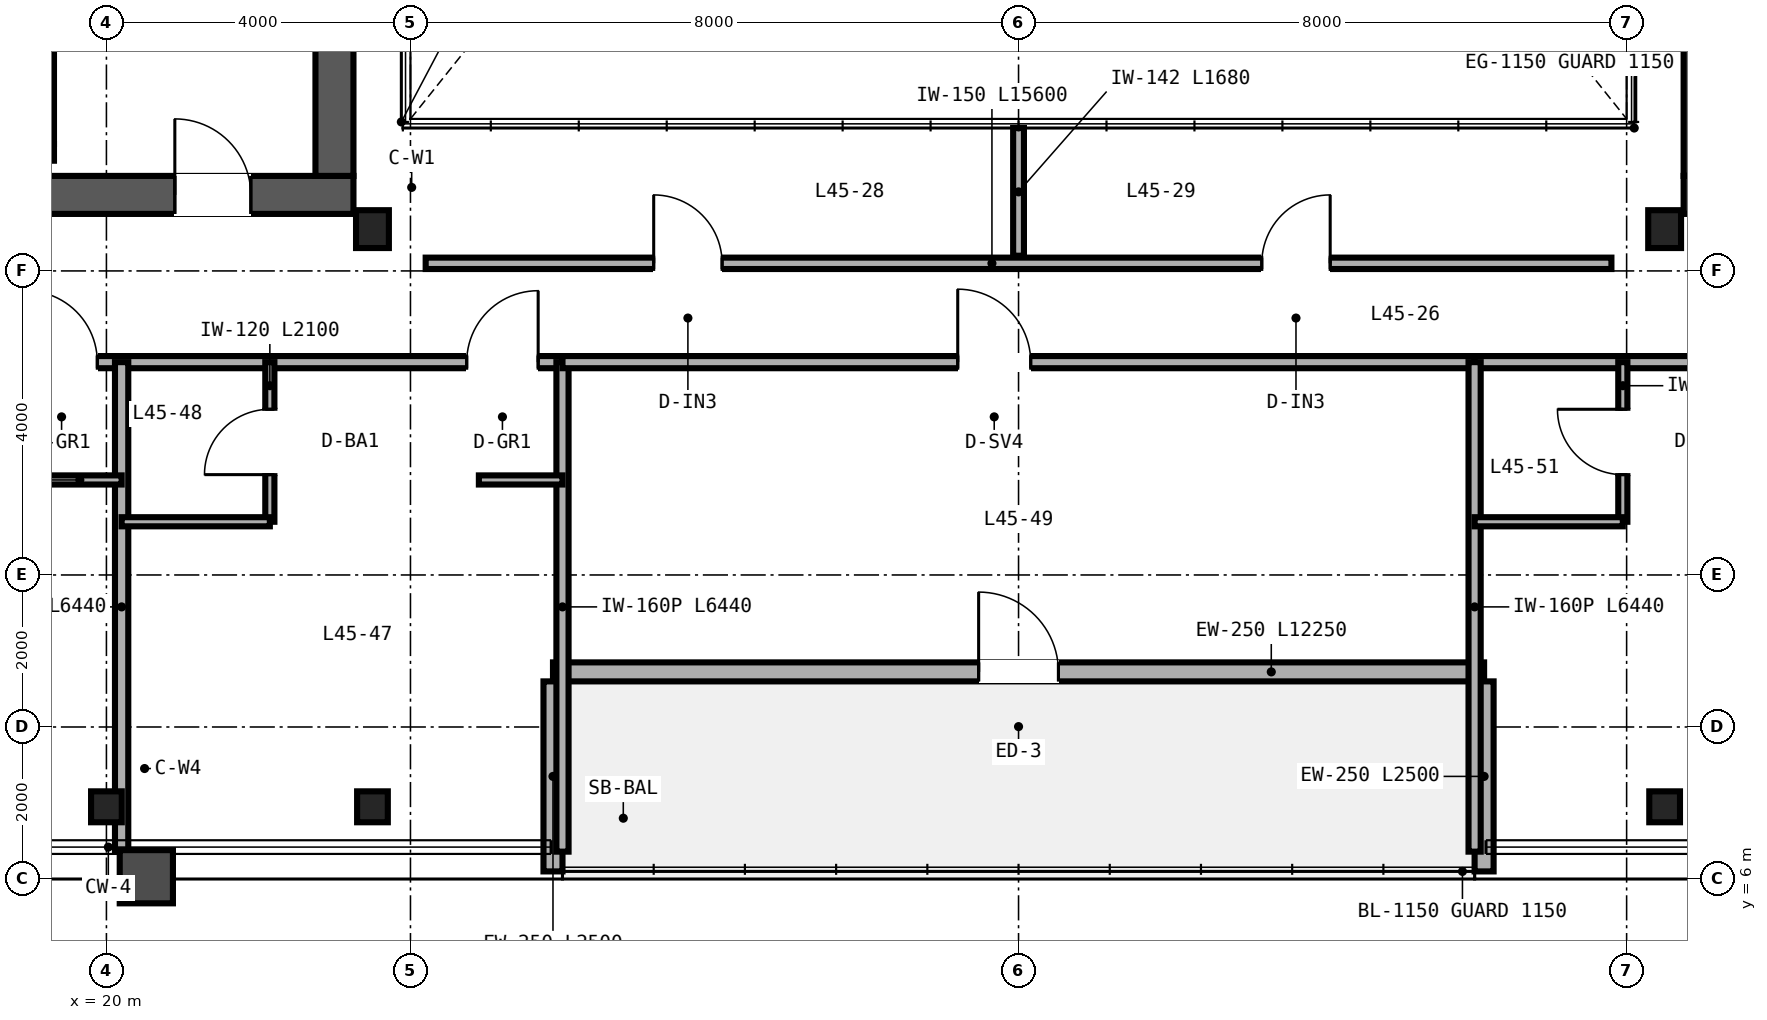
"""IFC4 building model, lengths in metres.
Left out: names, types, materials, properties, quantities, classifications, styles, units other than length and angle.
Written with IfcOpenShell. Run it as: python <this file> out.ifc"""

import sys

from ifc_helpers import new_model, si_unit, direction, frame, frame_2d, origin, origin_2d, place, context, subcontext, project, spatial, rectangle, i_section, extrude, source, transform, mapped, element, fill, save


model = new_model("IFC4")
c1 = context("Model", 3, precision=1e-05, world=origin(), true_north=direction((0.0, 1.0)))
c2 = subcontext(c1, "Body", "Model", "MODEL_VIEW")
j1 = project(units=[si_unit("LENGTHUNIT", "METRE"), si_unit("PLANEANGLEUNIT", "RADIAN")], contexts=[c1])
p1 = place(None, origin())
s1 = spatial("IfcSite", under=j1, at=p1, CompositionType="ELEMENT")
p2 = place(p1, origin())
s2 = spatial("IfcBuilding", under=s1, at=p2, CompositionType="ELEMENT")
p3 = place(p2, frame((0.0, 0.0, 181.2)))
s3 = spatial("IfcBuildingStorey", under=s2, at=p3, CompositionType="ELEMENT", Elevation=181.2)
p4 = place(p3, frame((10.75, 15.0, 0.0), z_axis=(0.0, 0.0, 1.0), x_axis=(1.0, 0.0, 0.0)))
e1 = element("IfcWall", 1, at=p4, inside=s3, PredefinedType="SHEAR", context=c2, shape_type="SweptSolid", body=[
    extrude(rectangle(XDim=12.5, YDim=0.5, at=frame_2d((6.25, 0.0))), origin(), (0.0, 0.0, 1.0), 3.37),
])
p5 = place(p4, frame((10.15, 0.0, 0.0)))
e2 = element("IfcOpeningElement", 2, at=p5, cuts=e1, PredefinedType="OPENING", context=c2, shape_type="SweptSolid", body=[
    extrude(rectangle(XDim=1.0, YDim=2.15, at=frame_2d((0.5, 1.075))), frame((0.0, 0.26, 0.0), z_axis=(0.0, -1.0, 0.0), x_axis=(1.0, 0.0, 0.0)), (0.0, 0.0, 1.0), 0.52),
])
p6 = place(p3, frame((23.0, 15.25, 0.0), z_axis=(0.0, 0.0, 1.0), x_axis=(0.0, 1.0, 0.0)))
e3 = element("IfcWall", 3, at=p6, inside=s3, PredefinedType="SHEAR", context=c2, shape_type="SweptSolid", body=[
    extrude(rectangle(XDim=21.5, YDim=0.5, at=frame_2d((10.75, 0.0))), origin(), (0.0, 0.0, 1.0), 3.37),
])
p7 = place(p3, frame((40.75, 15.0, 0.0), z_axis=(0.0, 0.0, 1.0), x_axis=(1.0, 0.0, 0.0)))
e4 = element("IfcWall", 4, at=p7, inside=s3, PredefinedType="SHEAR", context=c2, shape_type="SweptSolid", body=[
    extrude(rectangle(XDim=12.5, YDim=0.5, at=frame_2d((6.25, 0.0))), origin(), (0.0, 0.0, 1.0), 3.37),
])
p8 = place(p7, frame((4.35, 0.0, 0.0)))
e5 = element("IfcOpeningElement", 5, at=p8, cuts=e4, PredefinedType="OPENING", context=c2, shape_type="SweptSolid", body=[
    extrude(rectangle(XDim=1.0, YDim=2.15, at=frame_2d((0.5, 1.075))), frame((0.0, 0.26, 0.0), z_axis=(0.0, -1.0, 0.0), x_axis=(1.0, 0.0, 0.0)), (0.0, 0.0, 1.0), 0.52),
])
p9 = place(p3, frame((41.0, 15.25, 0.0), z_axis=(0.0, 0.0, 1.0), x_axis=(0.0, 1.0, 0.0)))
e6 = element("IfcWall", 6, at=p9, inside=s3, PredefinedType="SHEAR", context=c2, shape_type="SweptSolid", body=[
    extrude(rectangle(XDim=21.5, YDim=0.5, at=frame_2d((10.75, 0.0))), origin(), (0.0, 0.0, 1.0), 3.37),
])
p10 = place(p3, frame((11.25, 15.56, 0.0), z_axis=(0.0, 0.0, 1.0), x_axis=(1.0, 0.0, 0.0)))
e7 = element("IfcWall", 7, at=p10, inside=s3, PredefinedType="SHEAR", context=c2, shape_type="SweptSolid", body=[
    extrude(rectangle(XDim=8.06, YDim=0.22, at=frame_2d((4.03, 0.0))), origin(), (0.0, 0.0, 1.0), 3.4),
])
p11 = place(p3, frame((19.2, 15.67, 0.0), z_axis=(0.0, 0.0, 1.0), x_axis=(0.0, 1.0, 0.0)))
e8 = element("IfcWall", 8, at=p11, inside=s3, PredefinedType="SHEAR", context=c2, shape_type="SweptSolid", body=[
    extrude(rectangle(XDim=3.28, YDim=0.22, at=frame_2d((1.64, 0.0))), origin(), (0.0, 0.0, 1.0), 3.4),
])
m1 = source(origin(), c2, "Body", "SweptSolid", [
    extrude(i_section(OverallWidth=0.432, OverallDepth=0.498, WebThickness=0.056, FlangeThickness=0.089, FilletRadius=0.025, at=origin_2d()), origin(), (0.0, 0.0, 1.0), 3.37),
])
for number, where, z_axis, x_axis in (
    (9, (23.5, 14.55, 0.0), (0.0, 0.0, 1.0), (1.0, 0.0, 0.0)),
    (10, (40.5, 14.55, 0.0), (0.0, 0.0, 1.0), (1.0, 0.0, 0.0)),
):
    element("IfcColumn", number, at=place(p3, frame(where, z_axis=z_axis, x_axis=x_axis)), inside=s3, PredefinedType="COLUMN", context=c2, shape_type="MappedRepresentation", body=[
        mapped(m1, transform((0.0, 0.0, 0.0), scale=1.0)),
    ])
m2 = source(origin(), c2, "Body", "SweptSolid", [
    extrude(i_section(OverallWidth=0.404, OverallDepth=0.407, WebThickness=0.027, FlangeThickness=0.044, FilletRadius=0.025, at=origin_2d()), origin(), (0.0, 0.0, 1.0), 3.37),
])
for number, where, z_axis, x_axis in (
    (11, (20.0, 6.95, 0.0), (0.0, 0.0, 1.0), (1.0, 0.0, 0.0)),
    (12, (23.5, 6.95, 0.0), (0.0, 0.0, 1.0), (1.0, 0.0, 0.0)),
    (13, (40.5, 6.95, 0.0), (0.0, 0.0, 1.0), (1.0, 0.0, 0.0)),
):
    element("IfcColumn", number, at=place(p3, frame(where, z_axis=z_axis, x_axis=x_axis)), inside=s3, PredefinedType="COLUMN", context=c2, shape_type="MappedRepresentation", body=[
        mapped(m2, transform((0.0, 0.0, 0.0), scale=1.0)),
    ])
p12 = place(p3, frame((25.875, 8.725, 0.0), z_axis=(0.0, 0.0, 1.0), x_axis=(1.0, 0.0, 0.0)))
e14 = element("IfcWall", 14, at=p12, inside=s3, PredefinedType="SOLIDWALL", context=c2, shape_type="SweptSolid", body=[
    extrude(rectangle(XDim=12.25, YDim=0.25, at=frame_2d((6.125, 0.0))), origin(), (0.0, 0.0, 1.0), 3.37),
])
p13 = place(p12, frame((5.6, 0.0, 0.0)))
e15 = element("IfcOpeningElement", 15, at=p13, cuts=e14, PredefinedType="OPENING", context=c2, shape_type="SweptSolid", body=[
    extrude(rectangle(XDim=1.05, YDim=2.15, at=frame_2d((0.525, 1.075))), frame((0.0, 0.135, 0.0), z_axis=(0.0, -1.0, 0.0), x_axis=(1.0, 0.0, 0.0)), (0.0, 0.0, 1.0), 0.27),
])
for number, where, z_axis, x_axis in (
    (16, (25.875, 6.1, 0.0), (0.0, 0.0, 1.0), (0.0, 1.0, 0.0)),
    (17, (38.125, 6.1, 0.0), (0.0, 0.0, 1.0), (0.0, 1.0, 0.0)),
):
    element("IfcWall", number, at=place(p3, frame(where, z_axis=z_axis, x_axis=x_axis)), inside=s3, PredefinedType="SOLIDWALL", context=c2, shape_type="SweptSolid", body=[
        extrude(rectangle(XDim=2.5, YDim=0.25, at=frame_2d((1.25, 0.0))), origin(), (0.0, 0.0, 1.0), 2.443),
    ])
p14 = place(p3, frame((24.2, 14.1, 0.0), z_axis=(0.0, 0.0, 1.0), x_axis=(1.0, 0.0, 0.0)))
e18 = element("IfcWall", 18, at=p14, inside=s3, PredefinedType="PARTITIONING", context=c2, shape_type="SweptSolid", body=[
    extrude(rectangle(XDim=15.6, YDim=0.15, at=frame_2d((7.8, 0.0))), origin(), (0.0, 0.0, 1.0), 3.37),
])
p15 = place(p14, frame((3.0, 0.0, 0.0)))
e19 = element("IfcOpeningElement", 19, at=p15, cuts=e18, PredefinedType="OPENING", context=c2, shape_type="SweptSolid", body=[
    extrude(rectangle(XDim=0.9, YDim=2.15, at=frame_2d((0.45, 1.075))), frame((0.0, 0.085, 0.0), z_axis=(0.0, -1.0, 0.0), x_axis=(1.0, 0.0, 0.0)), (0.0, 0.0, 1.0), 0.17),
])
p16 = place(p14, frame((11.0, 0.0, 0.0)))
e20 = element("IfcOpeningElement", 20, at=p16, cuts=e18, PredefinedType="OPENING", context=c2, shape_type="SweptSolid", body=[
    extrude(rectangle(XDim=0.9, YDim=2.15, at=frame_2d((0.45, 1.075))), frame((0.0, 0.085, 0.0), z_axis=(0.0, -1.0, 0.0), x_axis=(1.0, 0.0, 0.0)), (0.0, 0.0, 1.0), 0.17),
])
p17 = place(p3, frame((32.0, 14.2, 0.0), z_axis=(0.0, 0.0, 1.0), x_axis=(0.0, 1.0, 0.0)))
e21 = element("IfcWall", 21, at=p17, inside=s3, PredefinedType="PARTITIONING", context=c2, shape_type="SweptSolid", body=[
    extrude(rectangle(XDim=1.68, YDim=0.142, at=frame_2d((0.84, 0.0))), origin(), (0.0, 0.0, 1.0), 3.37),
])
p18 = place(p3, frame((14.0, 12.8, 0.0), z_axis=(0.0, 0.0, 1.0), x_axis=(1.0, 0.0, 0.0)))
e22 = element("IfcWall", 22, at=p18, inside=s3, PredefinedType="PARTITIONING", context=c2, shape_type="SweptSolid", body=[
    extrude(rectangle(XDim=12.0, YDim=0.16, at=frame_2d((6.0, 0.0))), origin(), (0.0, 0.0, 1.0), 2.913),
])
p19 = place(p18, frame((4.94, 0.0, 0.0)))
e23 = element("IfcOpeningElement", 23, at=p19, cuts=e22, PredefinedType="OPENING", context=c2, shape_type="SweptSolid", body=[
    extrude(rectangle(XDim=0.94, YDim=2.15, at=frame_2d((0.47, 1.075))), frame((0.0, 0.09, 0.0), z_axis=(0.0, -1.0, 0.0), x_axis=(1.0, 0.0, 0.0)), (0.0, 0.0, 1.0), 0.18),
])
p20 = place(p18, frame((10.74, 0.0, 0.0)))
e24 = element("IfcOpeningElement", 24, at=p20, cuts=e22, PredefinedType="OPENING", context=c2, shape_type="SweptSolid", body=[
    extrude(rectangle(XDim=0.94, YDim=2.15, at=frame_2d((0.47, 1.075))), frame((0.0, 0.09, 0.0), z_axis=(0.0, -1.0, 0.0), x_axis=(1.0, 0.0, 0.0)), (0.0, 0.0, 1.0), 0.18),
])
p21 = place(p3, frame((26.0, 6.36, 0.0), z_axis=(0.0, 0.0, 1.0), x_axis=(0.0, 1.0, 0.0)))
e25 = element("IfcWall", 25, at=p21, inside=s3, PredefinedType="PARTITIONING", context=c2, shape_type="SweptSolid", body=[
    extrude(rectangle(XDim=6.44, YDim=0.16, at=frame_2d((3.22, 0.0))), origin(), (0.0, 0.0, 1.0), 2.443),
])
p22 = place(p3, frame((20.2, 6.36, 0.0), z_axis=(0.0, 0.0, 1.0), x_axis=(0.0, 1.0, 0.0)))
e26 = element("IfcWall", 26, at=p22, inside=s3, PredefinedType="PARTITIONING", context=c2, shape_type="SweptSolid", body=[
    extrude(rectangle(XDim=6.44, YDim=0.175, at=frame_2d((3.22, 0.0))), origin(), (0.0, 0.0, 1.0), 2.677),
])
p23 = place(p3, frame((19.1, 11.25, 0.0), z_axis=(0.0, 0.0, 1.0), x_axis=(1.0, 0.0, 0.0)))
e27 = element("IfcWall", 27, at=p23, inside=s3, PredefinedType="PARTITIONING", context=c2, shape_type="SweptSolid", body=[
    extrude(rectangle(XDim=1.1, YDim=0.12, at=frame_2d((0.55, 0.0))), origin(), (0.0, 0.0, 1.0), 3.37),
])
p24 = place(p3, frame((22.15, 10.7, 0.0), z_axis=(0.0, 0.0, 1.0), x_axis=(0.0, 1.0, 0.0)))
e28 = element("IfcWall", 28, at=p24, inside=s3, PredefinedType="PARTITIONING", context=c2, shape_type="SweptSolid", body=[
    extrude(rectangle(XDim=2.1, YDim=0.12, at=frame_2d((1.05, 0.0))), origin(), (0.0, 0.0, 1.0), 3.37),
])
p25 = place(p24, frame((0.62, 0.0, 0.0)))
e29 = element("IfcOpeningElement", 29, at=p25, cuts=e28, PredefinedType="OPENING", context=c2, shape_type="SweptSolid", body=[
    extrude(rectangle(XDim=0.86, YDim=2.1, at=frame_2d((0.43, 1.05))), frame((0.0, 0.07, 0.0), z_axis=(0.0, -1.0, 0.0), x_axis=(1.0, 0.0, 0.0)), (0.0, 0.0, 1.0), 0.14),
])
p26 = place(p3, frame((20.2, 10.7, 0.0), z_axis=(0.0, 0.0, 1.0), x_axis=(1.0, 0.0, 0.0)))
e30 = element("IfcWall", 30, at=p26, inside=s3, PredefinedType="PARTITIONING", context=c2, shape_type="SweptSolid", body=[
    extrude(rectangle(XDim=1.95, YDim=0.12, at=frame_2d((0.975, 0.0))), origin(), (0.0, 0.0, 1.0), 3.37),
])
p27 = place(p3, frame((24.9, 11.25, 0.0), z_axis=(0.0, 0.0, 1.0), x_axis=(1.0, 0.0, 0.0)))
e31 = element("IfcWall", 31, at=p27, inside=s3, PredefinedType="PARTITIONING", context=c2, shape_type="SweptSolid", body=[
    extrude(rectangle(XDim=1.1, YDim=0.12, at=frame_2d((0.55, 0.0))), origin(), (0.0, 0.0, 1.0), 3.37),
])
p28 = place(p3, frame((26.0, 12.8, 0.0), z_axis=(0.0, 0.0, 1.0), x_axis=(1.0, 0.0, 0.0)))
e32 = element("IfcWall", 32, at=p28, inside=s3, PredefinedType="PARTITIONING", context=c2, shape_type="SweptSolid", body=[
    extrude(rectangle(XDim=12.0, YDim=0.16, at=frame_2d((6.0, 0.0))), origin(), (0.0, 0.0, 1.0), 3.37),
])
p29 = place(p28, frame((5.2, 0.0, 0.0)))
e33 = element("IfcOpeningElement", 33, at=p29, cuts=e32, PredefinedType="OPENING", context=c2, shape_type="SweptSolid", body=[
    extrude(rectangle(XDim=0.96, YDim=2.15, at=frame_2d((0.48, 1.075))), frame((0.0, 0.09, 0.0), z_axis=(0.0, -1.0, 0.0), x_axis=(1.0, 0.0, 0.0)), (0.0, 0.0, 1.0), 0.18),
])
p30 = place(p3, frame((38.0, 12.8, 0.0), z_axis=(0.0, 0.0, 1.0), x_axis=(1.0, 0.0, 0.0)))
e34 = element("IfcWall", 34, at=p30, inside=s3, PredefinedType="PARTITIONING", context=c2, shape_type="SweptSolid", body=[
    extrude(rectangle(XDim=12.0, YDim=0.16, at=frame_2d((6.0, 0.0))), origin(), (0.0, 0.0, 1.0), 2.913),
])
p31 = place(p30, frame((4.94, 0.0, 0.0)))
e35 = element("IfcOpeningElement", 35, at=p31, cuts=e34, PredefinedType="OPENING", context=c2, shape_type="SweptSolid", body=[
    extrude(rectangle(XDim=0.94, YDim=2.15, at=frame_2d((0.47, 1.075))), frame((0.0, 0.09, 0.0), z_axis=(0.0, -1.0, 0.0), x_axis=(1.0, 0.0, 0.0)), (0.0, 0.0, 1.0), 0.18),
])
p32 = place(p30, frame((10.74, 0.0, 0.0)))
e36 = element("IfcOpeningElement", 36, at=p32, cuts=e34, PredefinedType="OPENING", context=c2, shape_type="SweptSolid", body=[
    extrude(rectangle(XDim=0.94, YDim=2.15, at=frame_2d((0.47, 1.075))), frame((0.0, 0.09, 0.0), z_axis=(0.0, -1.0, 0.0), x_axis=(1.0, 0.0, 0.0)), (0.0, 0.0, 1.0), 0.18),
])
p33 = place(p3, frame((38.0, 6.36, 0.0), z_axis=(0.0, 0.0, 1.0), x_axis=(0.0, 1.0, 0.0)))
e37 = element("IfcWall", 37, at=p33, inside=s3, PredefinedType="PARTITIONING", context=c2, shape_type="SweptSolid", body=[
    extrude(rectangle(XDim=6.44, YDim=0.16, at=frame_2d((3.22, 0.0))), origin(), (0.0, 0.0, 1.0), 2.443),
])
p34 = place(p3, frame((39.95, 10.7, 0.0), z_axis=(0.0, 0.0, 1.0), x_axis=(0.0, 1.0, 0.0)))
e38 = element("IfcWall", 38, at=p34, inside=s3, PredefinedType="PARTITIONING", context=c2, shape_type="SweptSolid", body=[
    extrude(rectangle(XDim=2.1, YDim=0.12, at=frame_2d((1.05, 0.0))), origin(), (0.0, 0.0, 1.0), 3.37),
])
p35 = place(p34, frame((0.62, 0.0, 0.0)))
e39 = element("IfcOpeningElement", 39, at=p35, cuts=e38, PredefinedType="OPENING", context=c2, shape_type="SweptSolid", body=[
    extrude(rectangle(XDim=0.86, YDim=2.1, at=frame_2d((0.43, 1.05))), frame((0.0, 0.07, 0.0), z_axis=(0.0, -1.0, 0.0), x_axis=(1.0, 0.0, 0.0)), (0.0, 0.0, 1.0), 0.14),
])
p36 = place(p3, frame((38.0, 10.7, 0.0), z_axis=(0.0, 0.0, 1.0), x_axis=(1.0, 0.0, 0.0)))
e40 = element("IfcWall", 40, at=p36, inside=s3, PredefinedType="PARTITIONING", context=c2, shape_type="SweptSolid", body=[
    extrude(rectangle(XDim=1.95, YDim=0.12, at=frame_2d((0.975, 0.0))), origin(), (0.0, 0.0, 1.0), 3.37),
])
m3 = source(origin(), c2, "Body", "SweptSolid", [
    extrude(rectangle(XDim=1.05, YDim=2.15, at=frame_2d((0.525, 1.075))), frame((0.0, 0.025, 0.0), z_axis=(0.0, -1.0, 0.0), x_axis=(1.0, 0.0, 0.0)), (0.0, 0.0, 1.0), 0.05),
])
p37 = place(p13, origin())
e41 = element("IfcDoor", 41, at=p37, inside=s3, OperationType="SINGLE_SWING_LEFT", PredefinedType="DOOR", context=c2, shape_type="MappedRepresentation", body=[
    mapped(m3, transform((0.0, 0.0, 0.0), scale=1.0)),
])
fill(e15, e41)
m4 = source(origin(), c2, "Body", "SweptSolid", [
    extrude(rectangle(XDim=1.0, YDim=2.15, at=frame_2d((0.5, 1.075))), frame((0.0, 0.025, 0.0), z_axis=(0.0, -1.0, 0.0), x_axis=(1.0, 0.0, 0.0)), (0.0, 0.0, 1.0), 0.05),
])
p38 = place(p5, origin())
e42 = element("IfcDoor", 42, at=p38, inside=s3, OperationType="SINGLE_SWING_LEFT", PredefinedType="DOOR", context=c2, shape_type="MappedRepresentation", body=[
    mapped(m4, transform((0.0, 0.0, 0.0), scale=1.0)),
])
fill(e2, e42)
m5 = source(origin(), c2, "Body", "SweptSolid", [
    extrude(rectangle(XDim=0.9, YDim=2.15, at=frame_2d((0.45, 1.075))), frame((0.0, 0.025, 0.0), z_axis=(0.0, -1.0, 0.0), x_axis=(1.0, 0.0, 0.0)), (0.0, 0.0, 1.0), 0.05),
])
p39 = place(p15, origin())
e43 = element("IfcDoor", 43, at=p39, inside=s3, OperationType="SINGLE_SWING_LEFT", PredefinedType="DOOR", context=c2, shape_type="MappedRepresentation", body=[
    mapped(m5, transform((0.0, 0.0, 0.0), scale=1.0)),
])
fill(e19, e43)
p40 = place(p16, origin())
e44 = element("IfcDoor", 44, at=p40, inside=s3, OperationType="SINGLE_SWING_RIGHT", PredefinedType="DOOR", context=c2, shape_type="MappedRepresentation", body=[
    mapped(m5, transform((0.0, 0.0, 0.0), scale=1.0)),
])
fill(e20, e44)
m6 = source(origin(), c2, "Body", "SweptSolid", [
    extrude(rectangle(XDim=0.86, YDim=2.1, at=frame_2d((0.43, 1.05))), frame((0.0, 0.025, 0.0), z_axis=(0.0, -1.0, 0.0), x_axis=(1.0, 0.0, 0.0)), (0.0, 0.0, 1.0), 0.05),
])
p41 = place(p25, origin())
e45 = element("IfcDoor", 45, at=p41, inside=s3, OperationType="SINGLE_SWING_LEFT", PredefinedType="DOOR", context=c2, shape_type="MappedRepresentation", body=[
    mapped(m6, transform((0.0, 0.0, 0.0), scale=1.0)),
])
fill(e29, e45)
m7 = source(origin(), c2, "Body", "SweptSolid", [
    extrude(rectangle(XDim=0.94, YDim=2.15, at=frame_2d((0.47, 1.075))), frame((0.0, 0.025, 0.0), z_axis=(0.0, -1.0, 0.0), x_axis=(1.0, 0.0, 0.0)), (0.0, 0.0, 1.0), 0.05),
])
p42 = place(p19, origin())
e46 = element("IfcDoor", 46, at=p42, inside=s3, OperationType="SINGLE_SWING_LEFT", PredefinedType="DOOR", context=c2, shape_type="MappedRepresentation", body=[
    mapped(m7, transform((0.0, 0.0, 0.0), scale=1.0)),
])
fill(e23, e46)
p43 = place(p20, origin())
e47 = element("IfcDoor", 47, at=p43, inside=s3, OperationType="SINGLE_SWING_RIGHT", PredefinedType="DOOR", context=c2, shape_type="MappedRepresentation", body=[
    mapped(m7, transform((0.0, 0.0, 0.0), scale=1.0)),
])
fill(e24, e47)
m8 = source(origin(), c2, "Body", "SweptSolid", [
    extrude(rectangle(XDim=0.96, YDim=2.15, at=frame_2d((0.48, 1.075))), frame((0.0, 0.025, 0.0), z_axis=(0.0, -1.0, 0.0), x_axis=(1.0, 0.0, 0.0)), (0.0, 0.0, 1.0), 0.05),
])
p44 = place(p29, origin())
e48 = element("IfcDoor", 48, at=p44, inside=s3, OperationType="SINGLE_SWING_LEFT", PredefinedType="DOOR", context=c2, shape_type="MappedRepresentation", body=[
    mapped(m8, transform((0.0, 0.0, 0.0), scale=1.0)),
])
fill(e33, e48)
p45 = place(p35, origin())
e49 = element("IfcDoor", 49, at=p45, inside=s3, OperationType="SINGLE_SWING_RIGHT", PredefinedType="DOOR", context=c2, shape_type="MappedRepresentation", body=[
    mapped(m6, transform((0.0, 0.0, 0.0), scale=1.0)),
])
fill(e39, e49)
save(model, sys.argv[1])
